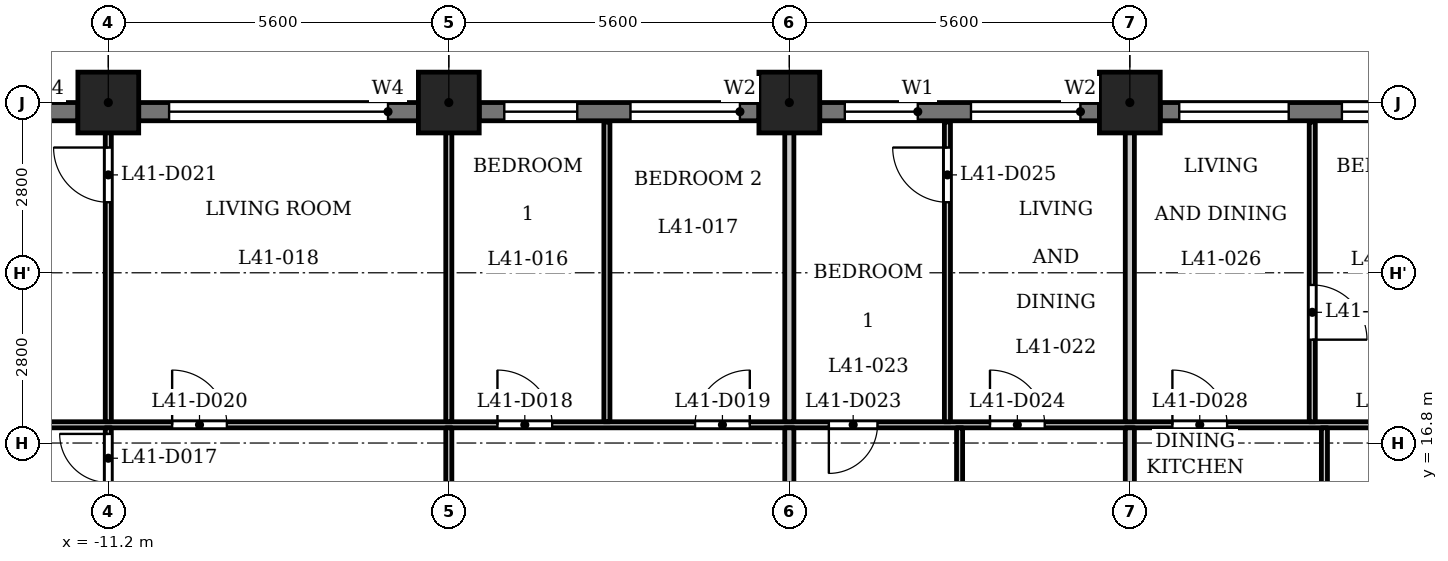
"""IFC4 building model, lengths in metres.
Left out: names, types, materials, properties, quantities, classifications, styles, units other than length and angle.
Written with IfcOpenShell. Run it as: python <this file> out.ifc"""

import sys

from ifc_helpers import new_model, si_unit, direction, frame, frame_2d, origin, origin_2d, place, context, subcontext, project, spatial, rectangle, extrude, element, fill, save


model = new_model("IFC4")
c1 = context("Model", 3, precision=1e-05, world=origin(), true_north=direction((0.0, 1.0)))
c2 = subcontext(c1, "Body", "Model", "MODEL_VIEW")
j1 = project(units=[si_unit("LENGTHUNIT", "METRE"), si_unit("PLANEANGLEUNIT", "RADIAN")], contexts=[c1])
p1 = place(None, origin())
s1 = spatial("IfcSite", under=j1, at=p1, CompositionType="ELEMENT")
p2 = place(p1, origin())
s2 = spatial("IfcBuilding", under=s1, at=p2, CompositionType="ELEMENT")
p3 = place(p2, frame((0.0, 0.0, 160.6)))
s3 = spatial("IfcBuildingStorey", under=s2, at=p3, CompositionType="ELEMENT", Elevation=160.6)
for number, where, z_axis, x_axis in (
    (1, (5.6, 22.4, 0.0), (0.0, 0.0, 1.0), (1.0, 0.0, 0.0)),
    (2, (0.0, 22.4, 0.0), (0.0, 0.0, 1.0), (1.0, 0.0, 0.0)),
    (3, (-5.6, 22.4, 0.0), (0.0, 0.0, 1.0), (1.0, 0.0, 0.0)),
    (4, (-11.2, 22.4, 0.0), (0.0, 0.0, 1.0), (1.0, 0.0, 0.0)),
):
    element("IfcColumn", number, at=place(p3, frame(where, z_axis=z_axis, x_axis=x_axis)), inside=s3, PredefinedType="COLUMN", context=c2, shape_type="SweptSolid", body=[
        extrude(rectangle(XDim=1.0, YDim=1.0, at=origin_2d()), origin(), (0.0, 0.0, 1.0), 3.5),
    ])
p4 = place(p3, frame((10.7, 22.25, 0.0), z_axis=(0.0, 0.0, 1.0), x_axis=(-1.0, 0.0, 0.0)))
e5 = element("IfcWall", 5, at=p4, inside=s3, PredefinedType="SOLIDWALL", context=c2, shape_type="SweptSolid", body=[
    extrude(rectangle(XDim=4.6, YDim=0.3, at=frame_2d((2.3, 0.0))), origin(), (0.0, 0.0, 1.0), 2.45),
])
p5 = place(p4, frame((0.413, 0.0, 0.6)))
e6 = element("IfcOpeningElement", 6, at=p5, cuts=e5, PredefinedType="OPENING", context=c2, shape_type="SweptSolid", body=[
    extrude(rectangle(XDim=1.2, YDim=1.55, at=frame_2d((0.6, 0.775))), frame((0.0, 0.16, 0.0), z_axis=(0.0, -1.0, 0.0), x_axis=(1.0, 0.0, 0.0)), (0.0, 0.0, 1.0), 0.32),
])
p6 = place(p4, frame((2.488, 0.0, 0.9)))
e7 = element("IfcOpeningElement", 7, at=p6, cuts=e5, PredefinedType="OPENING", context=c2, shape_type="SweptSolid", body=[
    extrude(rectangle(XDim=1.8, YDim=1.25, at=frame_2d((0.9, 0.625))), frame((0.0, 0.16, 0.0), z_axis=(0.0, -1.0, 0.0), x_axis=(1.0, 0.0, 0.0)), (0.0, 0.0, 1.0), 0.32),
])
p7 = place(p3, frame((5.1, 22.25, 0.0), z_axis=(0.0, 0.0, 1.0), x_axis=(-1.0, 0.0, 0.0)))
e8 = element("IfcWall", 8, at=p7, inside=s3, PredefinedType="SOLIDWALL", context=c2, shape_type="SweptSolid", body=[
    extrude(rectangle(XDim=4.6, YDim=0.3, at=frame_2d((2.3, 0.0))), origin(), (0.0, 0.0, 1.0), 2.45),
])
p8 = place(p7, frame((0.312, 0.0, 0.9)))
e9 = element("IfcOpeningElement", 9, at=p8, cuts=e8, PredefinedType="OPENING", context=c2, shape_type="SweptSolid", body=[
    extrude(rectangle(XDim=1.8, YDim=1.25, at=frame_2d((0.9, 0.625))), frame((0.0, 0.16, 0.0), z_axis=(0.0, -1.0, 0.0), x_axis=(1.0, 0.0, 0.0)), (0.0, 0.0, 1.0), 0.32),
])
p9 = place(p7, frame((2.988, 0.0, 0.6)))
e10 = element("IfcOpeningElement", 10, at=p9, cuts=e8, PredefinedType="OPENING", context=c2, shape_type="SweptSolid", body=[
    extrude(rectangle(XDim=1.2, YDim=1.55, at=frame_2d((0.6, 0.775))), frame((0.0, 0.16, 0.0), z_axis=(0.0, -1.0, 0.0), x_axis=(1.0, 0.0, 0.0)), (0.0, 0.0, 1.0), 0.32),
])
p10 = place(p3, frame((-0.5, 22.25, 0.0), z_axis=(0.0, 0.0, 1.0), x_axis=(-1.0, 0.0, 0.0)))
e11 = element("IfcWall", 11, at=p10, inside=s3, PredefinedType="SOLIDWALL", context=c2, shape_type="SweptSolid", body=[
    extrude(rectangle(XDim=4.6, YDim=0.3, at=frame_2d((2.3, 0.0))), origin(), (0.0, 0.0, 1.0), 2.45),
])
p11 = place(p10, frame((0.312, 0.0, 0.9)))
e12 = element("IfcOpeningElement", 12, at=p11, cuts=e11, PredefinedType="OPENING", context=c2, shape_type="SweptSolid", body=[
    extrude(rectangle(XDim=1.8, YDim=1.25, at=frame_2d((0.9, 0.625))), frame((0.0, 0.16, 0.0), z_axis=(0.0, -1.0, 0.0), x_axis=(1.0, 0.0, 0.0)), (0.0, 0.0, 1.0), 0.32),
])
p12 = place(p10, frame((2.988, 0.0, 0.6)))
e13 = element("IfcOpeningElement", 13, at=p12, cuts=e11, PredefinedType="OPENING", context=c2, shape_type="SweptSolid", body=[
    extrude(rectangle(XDim=1.2, YDim=1.55, at=frame_2d((0.6, 0.775))), frame((0.0, 0.16, 0.0), z_axis=(0.0, -1.0, 0.0), x_axis=(1.0, 0.0, 0.0)), (0.0, 0.0, 1.0), 0.32),
])
p13 = place(p3, frame((-6.1, 22.25, 0.0), z_axis=(0.0, 0.0, 1.0), x_axis=(-1.0, 0.0, 0.0)))
e14 = element("IfcWall", 14, at=p13, inside=s3, PredefinedType="SOLIDWALL", context=c2, shape_type="SweptSolid", body=[
    extrude(rectangle(XDim=4.6, YDim=0.3, at=frame_2d((2.3, 0.0))), origin(), (0.0, 0.0, 1.0), 2.45),
])
p14 = place(p13, frame((0.5, 0.0, 1.2)))
e15 = element("IfcOpeningElement", 15, at=p14, cuts=e14, PredefinedType="OPENING", context=c2, shape_type="SweptSolid", body=[
    extrude(rectangle(XDim=3.6, YDim=0.95, at=frame_2d((1.8, 0.475))), frame((0.0, 0.16, 0.0), z_axis=(0.0, -1.0, 0.0), x_axis=(1.0, 0.0, 0.0)), (0.0, 0.0, 1.0), 0.32),
])
p15 = place(p3, frame((-11.7, 22.25, 0.0), z_axis=(0.0, 0.0, 1.0), x_axis=(-1.0, 0.0, 0.0)))
e16 = element("IfcWall", 16, at=p15, inside=s3, PredefinedType="SOLIDWALL", context=c2, shape_type="SweptSolid", body=[
    extrude(rectangle(XDim=4.6, YDim=0.3, at=frame_2d((2.3, 0.0))), origin(), (0.0, 0.0, 1.0), 2.45),
])
p16 = place(p15, frame((0.5, 0.0, 1.2)))
e17 = element("IfcOpeningElement", 17, at=p16, cuts=e16, PredefinedType="OPENING", context=c2, shape_type="SweptSolid", body=[
    extrude(rectangle(XDim=3.6, YDim=0.95, at=frame_2d((1.8, 0.475))), frame((0.0, 0.16, 0.0), z_axis=(0.0, -1.0, 0.0), x_axis=(1.0, 0.0, 0.0)), (0.0, 0.0, 1.0), 0.32),
])
p17 = place(p3, frame((-16.725, 17.1, 0.0), z_axis=(0.0, 0.0, 1.0), x_axis=(1.0, 0.0, 0.0)))
e18 = element("IfcWall", 18, at=p17, inside=s3, PredefinedType="PARTITIONING", context=c2, shape_type="SweptSolid", body=[
    extrude(rectangle(XDim=33.45, YDim=0.1, at=frame_2d((16.725, 0.0))), origin(), (0.0, 0.0, 1.0), 3.2),
])
p18 = place(p17, frame((11.925, 0.0, 0.0)))
e19 = element("IfcOpeningElement", 19, at=p18, cuts=e18, PredefinedType="OPENING", context=c2, shape_type="SweptSolid", body=[
    extrude(rectangle(XDim=0.9, YDim=2.1, at=frame_2d((0.45, 1.05))), frame((0.0, 0.06, 0.0), z_axis=(0.0, -1.0, 0.0), x_axis=(1.0, 0.0, 0.0)), (0.0, 0.0, 1.0), 0.12),
])
p19 = place(p17, frame((15.175, 0.0, 0.0)))
e20 = element("IfcOpeningElement", 20, at=p19, cuts=e18, PredefinedType="OPENING", context=c2, shape_type="SweptSolid", body=[
    extrude(rectangle(XDim=0.9, YDim=2.1, at=frame_2d((0.45, 1.05))), frame((0.0, 0.06, 0.0), z_axis=(0.0, -1.0, 0.0), x_axis=(1.0, 0.0, 0.0)), (0.0, 0.0, 1.0), 0.12),
])
p20 = place(p17, frame((6.575, 0.0, 0.0)))
e21 = element("IfcOpeningElement", 21, at=p20, cuts=e18, PredefinedType="OPENING", context=c2, shape_type="SweptSolid", body=[
    extrude(rectangle(XDim=0.9, YDim=2.1, at=frame_2d((0.45, 1.05))), frame((0.0, 0.06, 0.0), z_axis=(0.0, -1.0, 0.0), x_axis=(1.0, 0.0, 0.0)), (0.0, 0.0, 1.0), 0.12),
])
p21 = place(p17, frame((17.375, 0.0, 0.0)))
e22 = element("IfcOpeningElement", 22, at=p21, cuts=e18, PredefinedType="OPENING", context=c2, shape_type="SweptSolid", body=[
    extrude(rectangle(XDim=0.8, YDim=2.1, at=frame_2d((0.4, 1.05))), frame((0.0, 0.06, 0.0), z_axis=(0.0, -1.0, 0.0), x_axis=(1.0, 0.0, 0.0)), (0.0, 0.0, 1.0), 0.12),
])
p22 = place(p17, frame((20.025, 0.0, 0.0)))
e23 = element("IfcOpeningElement", 23, at=p22, cuts=e18, PredefinedType="OPENING", context=c2, shape_type="SweptSolid", body=[
    extrude(rectangle(XDim=0.9, YDim=2.1, at=frame_2d((0.45, 1.05))), frame((0.0, 0.06, 0.0), z_axis=(0.0, -1.0, 0.0), x_axis=(1.0, 0.0, 0.0)), (0.0, 0.0, 1.0), 0.12),
])
p23 = place(p17, frame((26.425, 0.0, 0.0)))
e24 = element("IfcOpeningElement", 24, at=p23, cuts=e18, PredefinedType="OPENING", context=c2, shape_type="SweptSolid", body=[
    extrude(rectangle(XDim=0.8, YDim=2.1, at=frame_2d((0.4, 1.05))), frame((0.0, 0.06, 0.0), z_axis=(0.0, -1.0, 0.0), x_axis=(1.0, 0.0, 0.0)), (0.0, 0.0, 1.0), 0.12),
])
p24 = place(p17, frame((23.025, 0.0, 0.0)))
e25 = element("IfcOpeningElement", 25, at=p24, cuts=e18, PredefinedType="OPENING", context=c2, shape_type="SweptSolid", body=[
    extrude(rectangle(XDim=0.9, YDim=2.1, at=frame_2d((0.45, 1.05))), frame((0.0, 0.06, 0.0), z_axis=(0.0, -1.0, 0.0), x_axis=(1.0, 0.0, 0.0)), (0.0, 0.0, 1.0), 0.12),
])
p25 = place(p17, frame((28.575, 0.0, 0.0)))
e26 = element("IfcOpeningElement", 26, at=p25, cuts=e18, PredefinedType="OPENING", context=c2, shape_type="SweptSolid", body=[
    extrude(rectangle(XDim=0.8, YDim=2.1, at=frame_2d((0.4, 1.05))), frame((0.0, 0.06, 0.0), z_axis=(0.0, -1.0, 0.0), x_axis=(1.0, 0.0, 0.0)), (0.0, 0.0, 1.0), 0.12),
])
p26 = place(p17, frame((30.725, 0.0, 0.0)))
e27 = element("IfcOpeningElement", 27, at=p26, cuts=e18, PredefinedType="OPENING", context=c2, shape_type="SweptSolid", body=[
    extrude(rectangle(XDim=0.9, YDim=2.1, at=frame_2d((0.45, 1.05))), frame((0.0, 0.06, 0.0), z_axis=(0.0, -1.0, 0.0), x_axis=(1.0, 0.0, 0.0)), (0.0, 0.0, 1.0), 0.12),
])
p27 = place(p3, frame((-11.2, 13.275, 0.0), z_axis=(0.0, 0.0, 1.0), x_axis=(0.0, 1.0, 0.0)))
e28 = element("IfcWall", 28, at=p27, inside=s3, PredefinedType="PARTITIONING", context=c2, shape_type="SweptSolid", body=[
    extrude(rectangle(XDim=3.775, YDim=0.1, at=frame_2d((1.888, 0.0))), origin(), (0.0, 0.0, 1.0), 3.2),
])
p28 = place(p27, frame((2.875, 0.0, 0.0)))
e29 = element("IfcOpeningElement", 29, at=p28, cuts=e28, PredefinedType="OPENING", context=c2, shape_type="SweptSolid", body=[
    extrude(rectangle(XDim=0.8, YDim=2.1, at=frame_2d((0.4, 1.05))), frame((0.0, 0.06, 0.0), z_axis=(0.0, -1.0, 0.0), x_axis=(1.0, 0.0, 0.0)), (0.0, 0.0, 1.0), 0.12),
])
p29 = place(p3, frame((-11.2, 17.15, 0.0), z_axis=(0.0, 0.0, 1.0), x_axis=(0.0, 1.0, 0.0)))
e30 = element("IfcWall", 30, at=p29, inside=s3, PredefinedType="PARTITIONING", context=c2, shape_type="SweptSolid", body=[
    extrude(rectangle(XDim=5.73, YDim=0.1, at=frame_2d((2.865, 0.0))), origin(), (0.0, 0.0, 1.0), 3.2),
])
p30 = place(p29, frame((3.61, 0.0, 0.0)))
e31 = element("IfcOpeningElement", 31, at=p30, cuts=e30, PredefinedType="OPENING", context=c2, shape_type="SweptSolid", body=[
    extrude(rectangle(XDim=0.9, YDim=2.1, at=frame_2d((0.45, 1.05))), frame((0.0, 0.06, 0.0), z_axis=(0.0, -1.0, 0.0), x_axis=(1.0, 0.0, 0.0)), (0.0, 0.0, 1.0), 0.12),
])
p31 = place(p3, frame((-5.6, 13.275, 0.0), z_axis=(0.0, 0.0, 1.0), x_axis=(0.0, 1.0, 0.0)))
e32 = element("IfcWall", 32, at=p31, inside=s3, PredefinedType="PARTITIONING", context=c2, shape_type="SweptSolid", body=[
    extrude(rectangle(XDim=3.775, YDim=0.1, at=frame_2d((1.888, 0.0))), origin(), (0.0, 0.0, 1.0), 3.2),
])
p32 = place(p31, frame((0.525, 0.0, 0.0)))
e33 = element("IfcOpeningElement", 33, at=p32, cuts=e32, PredefinedType="OPENING", context=c2, shape_type="SweptSolid", body=[
    extrude(rectangle(XDim=0.9, YDim=2.1, at=frame_2d((0.45, 1.05))), frame((0.0, 0.06, 0.0), z_axis=(0.0, -1.0, 0.0), x_axis=(1.0, 0.0, 0.0)), (0.0, 0.0, 1.0), 0.12),
])
p33 = place(p3, frame((-5.6, 17.15, 0.0), z_axis=(0.0, 0.0, 1.0), x_axis=(0.0, 1.0, 0.0)))
e34 = element("IfcWall", 34, at=p33, inside=s3, PredefinedType="PARTITIONING", context=c2, shape_type="SweptSolid", body=[
    extrude(rectangle(XDim=5.73, YDim=0.1, at=frame_2d((2.865, 0.0))), origin(), (0.0, 0.0, 1.0), 3.2),
])
p34 = place(p3, frame((-3.0, 17.15, 0.0), z_axis=(0.0, 0.0, 1.0), x_axis=(0.0, 1.0, 0.0)))
e35 = element("IfcWall", 35, at=p34, inside=s3, PredefinedType="PARTITIONING", context=c2, shape_type="SweptSolid", body=[
    extrude(rectangle(XDim=4.93, YDim=0.1, at=frame_2d((2.465, 0.0))), origin(), (0.0, 0.0, 1.0), 3.2),
])
p35 = place(p3, frame((0.0, 13.275, 0.0), z_axis=(0.0, 0.0, 1.0), x_axis=(0.0, 1.0, 0.0)))
e36 = element("IfcWall", 36, at=p35, inside=s3, PredefinedType="PARTITIONING", context=c2, shape_type="SweptSolid", body=[
    extrude(rectangle(XDim=3.775, YDim=0.15, at=frame_2d((1.888, 0.0))), origin(), (0.0, 0.0, 1.0), 3.2),
])
p36 = place(p3, frame((0.0, 17.15, 0.0), z_axis=(0.0, 0.0, 1.0), x_axis=(0.0, 1.0, 0.0)))
e37 = element("IfcWall", 37, at=p36, inside=s3, PredefinedType="PARTITIONING", context=c2, shape_type="SweptSolid", body=[
    extrude(rectangle(XDim=5.73, YDim=0.15, at=frame_2d((2.865, 0.0))), origin(), (0.0, 0.0, 1.0), 3.2),
])
p37 = place(p3, frame((2.6, 17.15, 0.0), z_axis=(0.0, 0.0, 1.0), x_axis=(0.0, 1.0, 0.0)))
e38 = element("IfcWall", 38, at=p37, inside=s3, PredefinedType="PARTITIONING", context=c2, shape_type="SweptSolid", body=[
    extrude(rectangle(XDim=4.93, YDim=0.1, at=frame_2d((2.465, 0.0))), origin(), (0.0, 0.0, 1.0), 3.2),
])
p38 = place(p37, frame((3.61, 0.0, 0.0)))
e39 = element("IfcOpeningElement", 39, at=p38, cuts=e38, PredefinedType="OPENING", context=c2, shape_type="SweptSolid", body=[
    extrude(rectangle(XDim=0.9, YDim=2.1, at=frame_2d((0.45, 1.05))), frame((0.0, 0.06, 0.0), z_axis=(0.0, -1.0, 0.0), x_axis=(1.0, 0.0, 0.0)), (0.0, 0.0, 1.0), 0.12),
])
p39 = place(p3, frame((2.8, 13.275, 0.0), z_axis=(0.0, 0.0, 1.0), x_axis=(0.0, 1.0, 0.0)))
e40 = element("IfcWall", 40, at=p39, inside=s3, PredefinedType="PARTITIONING", context=c2, shape_type="SweptSolid", body=[
    extrude(rectangle(XDim=3.775, YDim=0.1, at=frame_2d((1.888, 0.0))), origin(), (0.0, 0.0, 1.0), 3.2),
])
p40 = place(p3, frame((5.6, 13.275, 0.0), z_axis=(0.0, 0.0, 1.0), x_axis=(0.0, 1.0, 0.0)))
e41 = element("IfcWall", 41, at=p40, inside=s3, PredefinedType="PARTITIONING", context=c2, shape_type="SweptSolid", body=[
    extrude(rectangle(XDim=3.775, YDim=0.15, at=frame_2d((1.888, 0.0))), origin(), (0.0, 0.0, 1.0), 3.2),
])
p41 = place(p3, frame((5.6, 17.15, 0.0), z_axis=(0.0, 0.0, 1.0), x_axis=(0.0, 1.0, 0.0)))
e42 = element("IfcWall", 42, at=p41, inside=s3, PredefinedType="PARTITIONING", context=c2, shape_type="SweptSolid", body=[
    extrude(rectangle(XDim=5.73, YDim=0.15, at=frame_2d((2.865, 0.0))), origin(), (0.0, 0.0, 1.0), 3.2),
])
p42 = place(p3, frame((8.6, 17.15, 0.0), z_axis=(0.0, 0.0, 1.0), x_axis=(0.0, 1.0, 0.0)))
e43 = element("IfcWall", 43, at=p42, inside=s3, PredefinedType="PARTITIONING", context=c2, shape_type="SweptSolid", body=[
    extrude(rectangle(XDim=4.93, YDim=0.1, at=frame_2d((2.465, 0.0))), origin(), (0.0, 0.0, 1.0), 3.2),
])
p43 = place(p42, frame((1.35, 0.0, 0.0)))
e44 = element("IfcOpeningElement", 44, at=p43, cuts=e43, PredefinedType="OPENING", context=c2, shape_type="SweptSolid", body=[
    extrude(rectangle(XDim=0.9, YDim=2.1, at=frame_2d((0.45, 1.05))), frame((0.0, 0.06, 0.0), z_axis=(0.0, -1.0, 0.0), x_axis=(1.0, 0.0, 0.0)), (0.0, 0.0, 1.0), 0.12),
])
p44 = place(p3, frame((8.8, 13.275, 0.0), z_axis=(0.0, 0.0, 1.0), x_axis=(0.0, 1.0, 0.0)))
e45 = element("IfcWall", 45, at=p44, inside=s3, PredefinedType="PARTITIONING", context=c2, shape_type="SweptSolid", body=[
    extrude(rectangle(XDim=3.775, YDim=0.1, at=frame_2d((1.888, 0.0))), origin(), (0.0, 0.0, 1.0), 3.2),
])
p45 = place(p28, origin())
e46 = element("IfcDoor", 46, at=p45, inside=s3, OperationType="SINGLE_SWING_LEFT", PredefinedType="DOOR", context=c2, shape_type="SweptSolid", body=[
    extrude(rectangle(XDim=0.8, YDim=2.1, at=frame_2d((0.4, 1.05))), frame((0.0, 0.025, 0.0), z_axis=(0.0, -1.0, 0.0), x_axis=(1.0, 0.0, 0.0)), (0.0, 0.0, 1.0), 0.05),
])
fill(e29, e46)
p46 = place(p18, origin())
e47 = element("IfcDoor", 47, at=p46, inside=s3, OperationType="SINGLE_SWING_RIGHT", PredefinedType="DOOR", context=c2, shape_type="SweptSolid", body=[
    extrude(rectangle(XDim=0.9, YDim=2.1, at=frame_2d((0.45, 1.05))), frame((0.0, 0.025, 0.0), z_axis=(0.0, -1.0, 0.0), x_axis=(1.0, 0.0, 0.0)), (0.0, 0.0, 1.0), 0.05),
])
fill(e19, e47)
p47 = place(p19, origin())
e48 = element("IfcDoor", 48, at=p47, inside=s3, OperationType="SINGLE_SWING_LEFT", PredefinedType="DOOR", context=c2, shape_type="SweptSolid", body=[
    extrude(rectangle(XDim=0.9, YDim=2.1, at=frame_2d((0.45, 1.05))), frame((0.0, 0.025, 0.0), z_axis=(0.0, -1.0, 0.0), x_axis=(1.0, 0.0, 0.0)), (0.0, 0.0, 1.0), 0.05),
])
fill(e20, e48)
p48 = place(p20, origin())
e49 = element("IfcDoor", 49, at=p48, inside=s3, OperationType="SINGLE_SWING_RIGHT", PredefinedType="DOOR", context=c2, shape_type="SweptSolid", body=[
    extrude(rectangle(XDim=0.9, YDim=2.1, at=frame_2d((0.45, 1.05))), frame((0.0, 0.025, 0.0), z_axis=(0.0, -1.0, 0.0), x_axis=(1.0, 0.0, 0.0)), (0.0, 0.0, 1.0), 0.05),
])
fill(e21, e49)
p49 = place(p30, origin())
e50 = element("IfcDoor", 50, at=p49, inside=s3, OperationType="SINGLE_SWING_LEFT", PredefinedType="DOOR", context=c2, shape_type="SweptSolid", body=[
    extrude(rectangle(XDim=0.9, YDim=2.1, at=frame_2d((0.45, 1.05))), frame((0.0, 0.025, 0.0), z_axis=(0.0, -1.0, 0.0), x_axis=(1.0, 0.0, 0.0)), (0.0, 0.0, 1.0), 0.05),
])
fill(e31, e50)
p50 = place(p21, origin())
e51 = element("IfcDoor", 51, at=p50, inside=s3, OperationType="SINGLE_SWING_LEFT", PredefinedType="DOOR", context=c2, shape_type="SweptSolid", body=[
    extrude(rectangle(XDim=0.8, YDim=2.1, at=frame_2d((0.4, 1.05))), frame((0.0, 0.025, 0.0), z_axis=(0.0, -1.0, 0.0), x_axis=(1.0, 0.0, 0.0)), (0.0, 0.0, 1.0), 0.05),
])
fill(e22, e51)
p51 = place(p22, origin())
e52 = element("IfcDoor", 52, at=p51, inside=s3, OperationType="SINGLE_SWING_RIGHT", PredefinedType="DOOR", context=c2, shape_type="SweptSolid", body=[
    extrude(rectangle(XDim=0.9, YDim=2.1, at=frame_2d((0.45, 1.05))), frame((0.0, 0.025, 0.0), z_axis=(0.0, -1.0, 0.0), x_axis=(1.0, 0.0, 0.0)), (0.0, 0.0, 1.0), 0.05),
])
fill(e23, e52)
p52 = place(p38, origin())
e53 = element("IfcDoor", 53, at=p52, inside=s3, OperationType="SINGLE_SWING_LEFT", PredefinedType="DOOR", context=c2, shape_type="SweptSolid", body=[
    extrude(rectangle(XDim=0.9, YDim=2.1, at=frame_2d((0.45, 1.05))), frame((0.0, 0.025, 0.0), z_axis=(0.0, -1.0, 0.0), x_axis=(1.0, 0.0, 0.0)), (0.0, 0.0, 1.0), 0.05),
])
fill(e39, e53)
p53 = place(p24, origin())
e54 = element("IfcDoor", 54, at=p53, inside=s3, OperationType="SINGLE_SWING_RIGHT", PredefinedType="DOOR", context=c2, shape_type="SweptSolid", body=[
    extrude(rectangle(XDim=0.9, YDim=2.1, at=frame_2d((0.45, 1.05))), frame((0.0, 0.025, 0.0), z_axis=(0.0, -1.0, 0.0), x_axis=(1.0, 0.0, 0.0)), (0.0, 0.0, 1.0), 0.05),
])
fill(e25, e54)
p54 = place(p43, origin())
e55 = element("IfcDoor", 55, at=p54, inside=s3, OperationType="SINGLE_SWING_LEFT", PredefinedType="DOOR", context=c2, shape_type="SweptSolid", body=[
    extrude(rectangle(XDim=0.9, YDim=2.1, at=frame_2d((0.45, 1.05))), frame((0.0, 0.025, 0.0), z_axis=(0.0, -1.0, 0.0), x_axis=(1.0, 0.0, 0.0)), (0.0, 0.0, 1.0), 0.05),
])
fill(e44, e55)
p55 = place(p5, origin())
e56 = element("IfcWindow", 56, at=p55, inside=s3, PartitioningType="SINGLE_PANEL", PredefinedType="WINDOW", context=c2, shape_type="SweptSolid", body=[
    extrude(rectangle(XDim=1.2, YDim=1.55, at=frame_2d((0.6, 0.775))), frame((0.0, 0.03, 0.0), z_axis=(0.0, -1.0, 0.0), x_axis=(1.0, 0.0, 0.0)), (0.0, 0.0, 1.0), 0.06),
])
fill(e6, e56)
p56 = place(p6, origin())
e57 = element("IfcWindow", 57, at=p56, inside=s3, PartitioningType="SINGLE_PANEL", PredefinedType="WINDOW", context=c2, shape_type="SweptSolid", body=[
    extrude(rectangle(XDim=1.8, YDim=1.25, at=frame_2d((0.9, 0.625))), frame((0.0, 0.03, 0.0), z_axis=(0.0, -1.0, 0.0), x_axis=(1.0, 0.0, 0.0)), (0.0, 0.0, 1.0), 0.06),
])
fill(e7, e57)
p57 = place(p8, origin())
e58 = element("IfcWindow", 58, at=p57, inside=s3, PartitioningType="SINGLE_PANEL", PredefinedType="WINDOW", context=c2, shape_type="SweptSolid", body=[
    extrude(rectangle(XDim=1.8, YDim=1.25, at=frame_2d((0.9, 0.625))), frame((0.0, 0.03, 0.0), z_axis=(0.0, -1.0, 0.0), x_axis=(1.0, 0.0, 0.0)), (0.0, 0.0, 1.0), 0.06),
])
fill(e9, e58)
p58 = place(p9, origin())
e59 = element("IfcWindow", 59, at=p58, inside=s3, PartitioningType="SINGLE_PANEL", PredefinedType="WINDOW", context=c2, shape_type="SweptSolid", body=[
    extrude(rectangle(XDim=1.2, YDim=1.55, at=frame_2d((0.6, 0.775))), frame((0.0, 0.03, 0.0), z_axis=(0.0, -1.0, 0.0), x_axis=(1.0, 0.0, 0.0)), (0.0, 0.0, 1.0), 0.06),
])
fill(e10, e59)
p59 = place(p11, origin())
e60 = element("IfcWindow", 60, at=p59, inside=s3, PartitioningType="SINGLE_PANEL", PredefinedType="WINDOW", context=c2, shape_type="SweptSolid", body=[
    extrude(rectangle(XDim=1.8, YDim=1.25, at=frame_2d((0.9, 0.625))), frame((0.0, 0.03, 0.0), z_axis=(0.0, -1.0, 0.0), x_axis=(1.0, 0.0, 0.0)), (0.0, 0.0, 1.0), 0.06),
])
fill(e12, e60)
p60 = place(p12, origin())
e61 = element("IfcWindow", 61, at=p60, inside=s3, PartitioningType="SINGLE_PANEL", PredefinedType="WINDOW", context=c2, shape_type="SweptSolid", body=[
    extrude(rectangle(XDim=1.2, YDim=1.55, at=frame_2d((0.6, 0.775))), frame((0.0, 0.03, 0.0), z_axis=(0.0, -1.0, 0.0), x_axis=(1.0, 0.0, 0.0)), (0.0, 0.0, 1.0), 0.06),
])
fill(e13, e61)
p61 = place(p14, origin())
e62 = element("IfcWindow", 62, at=p61, inside=s3, PartitioningType="SINGLE_PANEL", PredefinedType="WINDOW", context=c2, shape_type="SweptSolid", body=[
    extrude(rectangle(XDim=3.6, YDim=0.95, at=frame_2d((1.8, 0.475))), frame((0.0, 0.03, 0.0), z_axis=(0.0, -1.0, 0.0), x_axis=(1.0, 0.0, 0.0)), (0.0, 0.0, 1.0), 0.06),
])
fill(e15, e62)
save(model, sys.argv[1])
